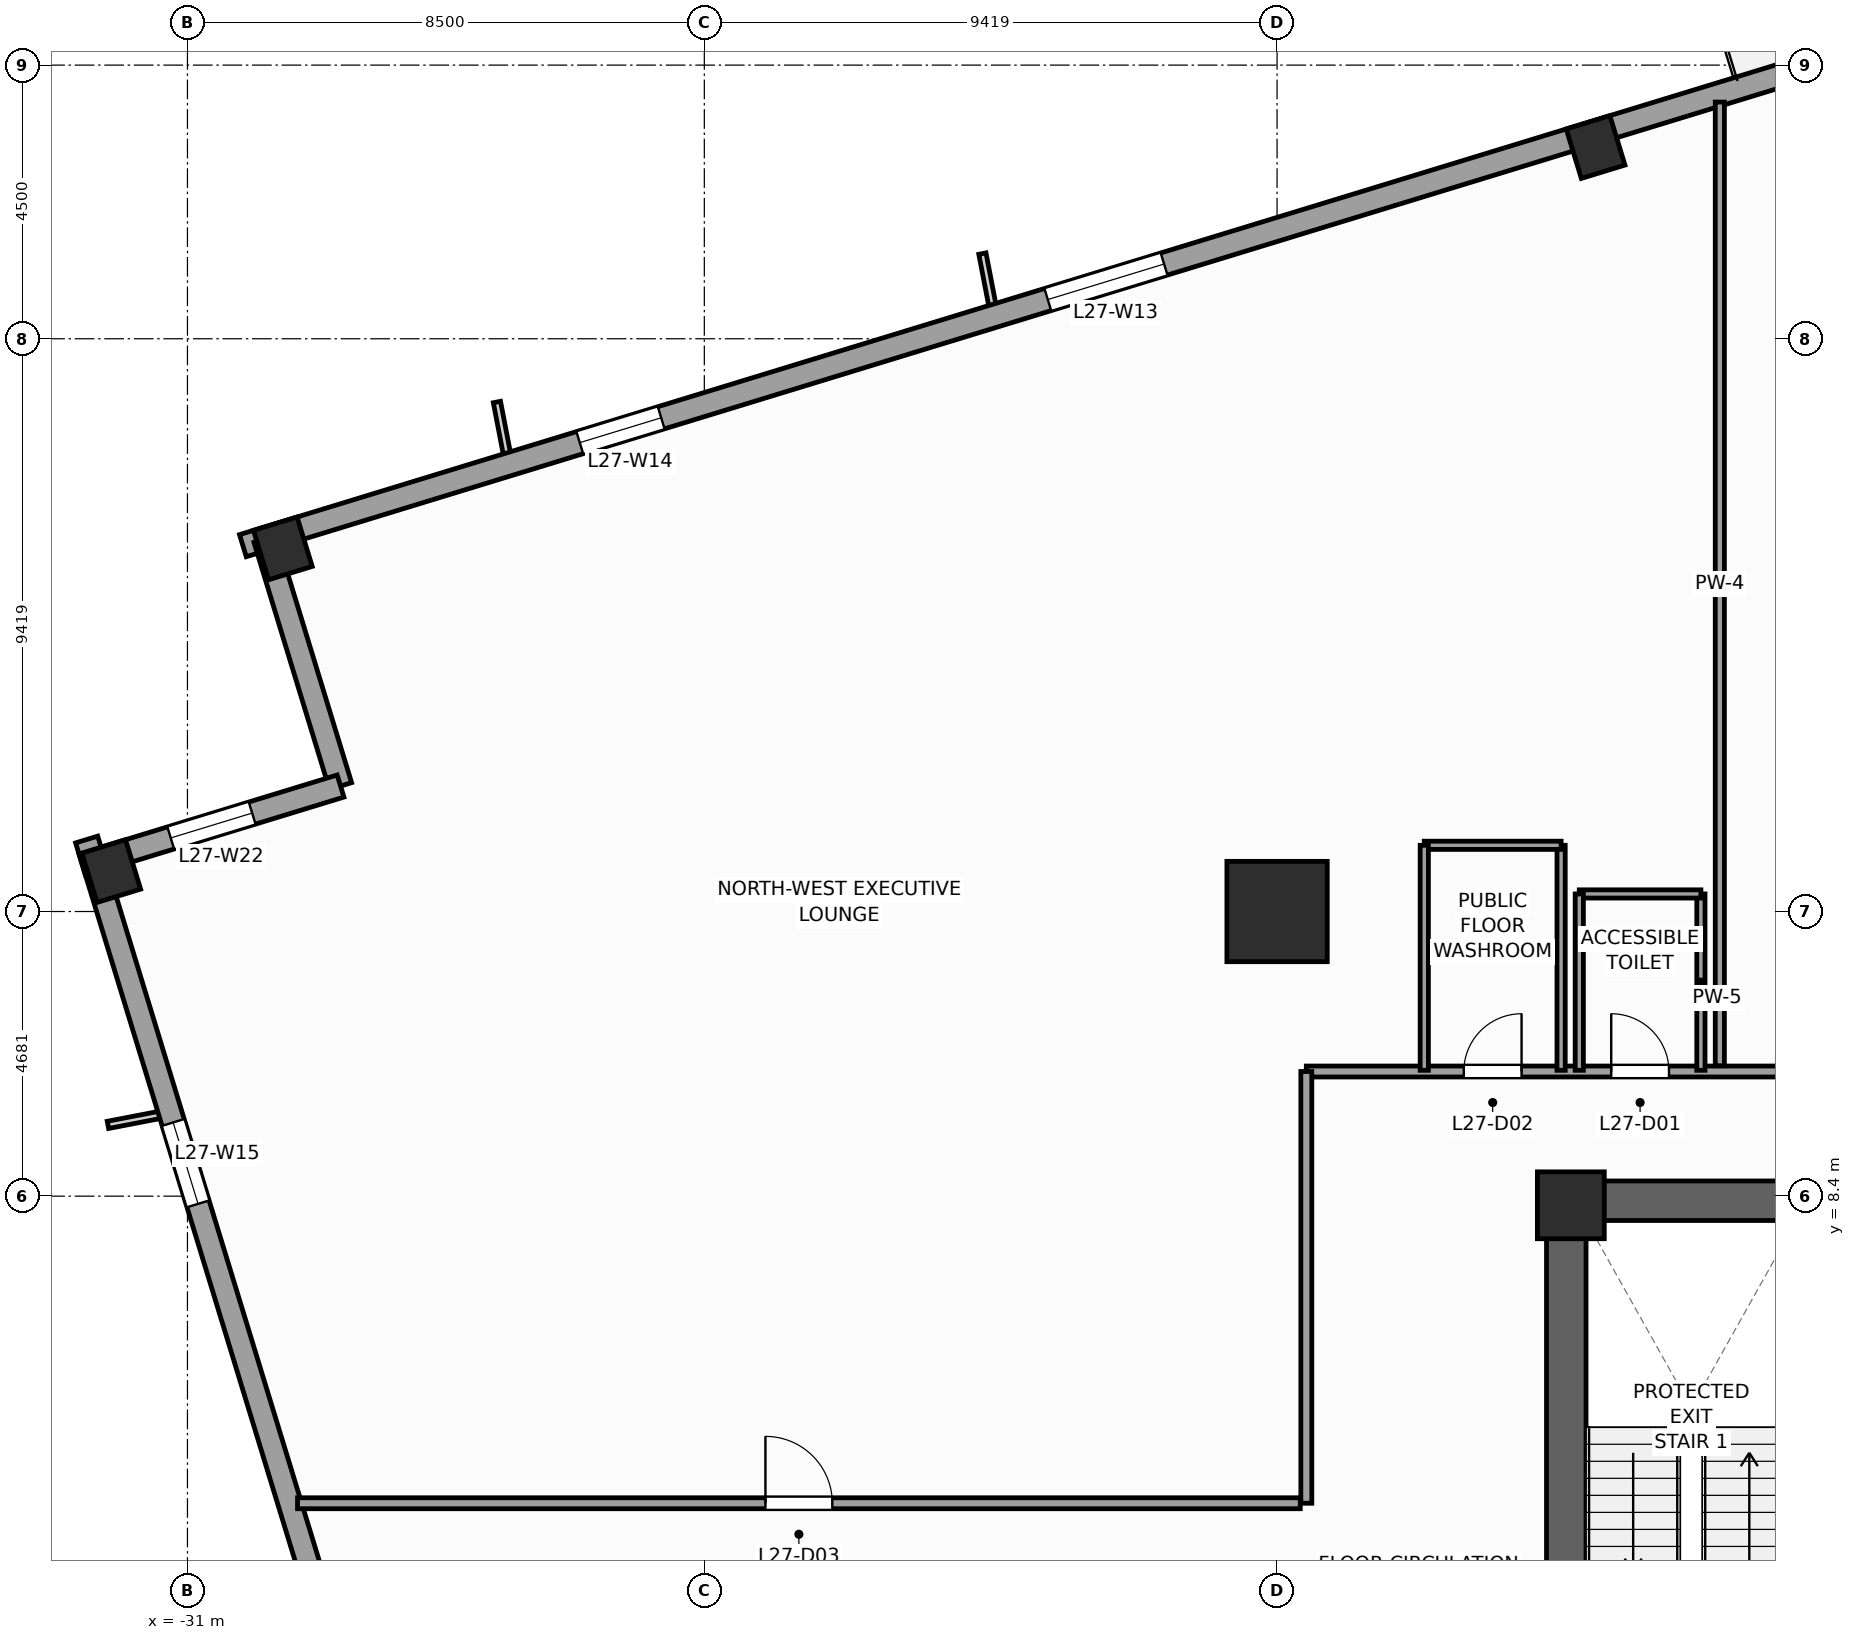
"""IFC4 building model, lengths in metres.
Left out: names, types, materials, properties, quantities, classifications, styles, units other than length and angle.
Written with IfcOpenShell. Run it as: python <this file> out.ifc"""

import sys

from ifc_helpers import new_model, si_unit, direction, frame, frame_2d, origin, origin_2d, place, context, subcontext, project, spatial, rectangle, extrude, source, transform, mapped, element, fill, save


model = new_model("IFC4")
c1 = context("Model", 3, precision=1e-05, world=origin(), true_north=direction((0.0, 1.0)))
c2 = subcontext(c1, "Body", "Model", "MODEL_VIEW")
j1 = project(units=[si_unit("LENGTHUNIT", "METRE"), si_unit("PLANEANGLEUNIT", "RADIAN")], contexts=[c1])
p1 = place(None, origin())
s1 = spatial("IfcSite", under=j1, at=p1, CompositionType="ELEMENT")
p2 = place(p1, origin())
s2 = spatial("IfcBuilding", under=s1, at=p2, CompositionType="ELEMENT")
p3 = place(p2, frame((0.0, 0.0, 115.2)))
s3 = spatial("IfcBuildingStorey", under=s2, at=p3, CompositionType="ELEMENT", Elevation=115.2)
p4 = place(p3, frame((-8.65, 8.325, 0.0), z_axis=(0.0, 0.0, 1.0), x_axis=(1.0, 0.0, 0.0)))
e1 = element("IfcWall", 1, at=p4, inside=s3, PredefinedType="SHEAR", context=c2, shape_type="SweptSolid", body=[
    extrude(rectangle(XDim=17.3, YDim=0.65, at=frame_2d((8.65, 0.0))), origin(), (0.0, 0.0, 1.0), 4.0),
])
p5 = place(p3, frame((-8.325, -8.0, 0.0), z_axis=(0.0, 0.0, 1.0), x_axis=(0.0, 1.0, 0.0)))
e2 = element("IfcWall", 2, at=p5, inside=s3, PredefinedType="SHEAR", context=c2, shape_type="SweptSolid", body=[
    extrude(rectangle(XDim=16.0, YDim=0.65, at=frame_2d((8.0, 0.0))), origin(), (0.0, 0.0, 1.0), 4.0),
])
p6 = place(p5, frame((4.69, 0.0, 0.0)))
e3 = element("IfcOpeningElement", 3, at=p6, cuts=e2, PredefinedType="OPENING", context=c2, shape_type="SweptSolid", body=[
    extrude(rectangle(XDim=1.3, YDim=2.2, at=frame_2d((0.65, 1.1))), frame((0.0, 0.335, 0.0), z_axis=(0.0, -1.0, 0.0), x_axis=(1.0, 0.0, 0.0)), (0.0, 0.0, 1.0), 0.67),
])
m1 = source(origin(), c2, "Body", "SweptSolid", [
    extrude(rectangle(XDim=1.1, YDim=1.1, at=origin_2d()), origin(), (0.0, 0.0, 1.0), 4.0),
])
p7 = place(p3, frame((-8.25, 8.25, 0.0), z_axis=(0.0, 0.0, 1.0), x_axis=(1.0, 0.0, 0.0)))
e4 = element("IfcColumn", 4, at=p7, inside=s3, PredefinedType="PILASTER", context=c2, shape_type="MappedRepresentation", body=[
    mapped(m1, transform((0.0, 0.0, 0.0), scale=1.0)),
])
m2 = source(origin(), c2, "Body", "SweptSolid", [
    extrude(rectangle(XDim=1.65, YDim=1.65, at=origin_2d()), origin(), (0.0, 0.0, 1.0), 4.0),
])
p8 = place(p3, frame((-13.081, 13.081, 0.0), z_axis=(0.0, 0.0, 1.0), x_axis=(1.0, 0.0, 0.0)))
e5 = element("IfcColumn", 5, at=p8, inside=s3, PredefinedType="COLUMN", context=c2, shape_type="MappedRepresentation", body=[
    mapped(m2, transform((0.0, 0.0, 0.0), scale=1.0)),
])
m3 = source(origin(), c2, "Body", "SweptSolid", [
    extrude(rectangle(XDim=0.75, YDim=0.85, at=origin_2d()), origin(), (0.0, 0.0, 1.0), 4.0),
])
for number, where, z_axis, x_axis in (
    (6, (-7.843, 25.653, 0.0), (0.0, 0.0, 1.0), (0.956, 0.292, 0.0)),
    (7, (-29.431, 19.052, 0.0), (0.0, 0.0, 1.0), (0.956, 0.292, 0.0)),
    (8, (-32.253, 13.746, 0.0), (0.0, 0.0, 1.0), (0.956, 0.292, 0.0)),
):
    element("IfcColumn", number, at=place(p3, frame(where, z_axis=z_axis, x_axis=x_axis)), inside=s3, PredefinedType="COLUMN", context=c2, shape_type="MappedRepresentation", body=[
        mapped(m3, transform((0.0, 0.0, 0.0), scale=1.0)),
    ])
p9 = place(p3, frame((14.265, 32.658, 0.0), z_axis=(0.0, 0.0, 1.0), x_axis=(-0.956304320851, -0.292373127906, 0.0)))
e9 = element("IfcWall", 9, at=p9, inside=s3, PredefinedType="STANDARD", context=c2, shape_type="SweptSolid", body=[
    extrude(rectangle(XDim=46.38, YDim=0.38, at=frame_2d((23.19, 0.0))), origin(), (0.0, 0.0, 1.0), 3.14),
])
p10 = place(p9, frame((17.065, 0.0, 0.0)))
e10 = element("IfcOpeningElement", 10, at=p10, cuts=e9, PredefinedType="OPENING", context=c2, shape_type="SweptSolid", body=[
    extrude(rectangle(XDim=1.05, YDim=2.25, at=frame_2d((0.525, 1.125))), frame((0.0, 0.2, 0.0), z_axis=(0.0, -1.0, 0.0), x_axis=(1.0, 0.0, 0.0)), (0.0, 0.0, 1.0), 0.4),
])
p11 = place(p9, frame((4.865, 0.0, 0.51)))
e11 = element("IfcOpeningElement", 11, at=p11, cuts=e9, PredefinedType="OPENING", context=c2, shape_type="SweptSolid", body=[
    extrude(rectangle(XDim=1.4, YDim=2.4, at=frame_2d((0.7, 1.2))), frame((0.0, 0.2, 0.0), z_axis=(0.0, -1.0, 0.0), x_axis=(1.0, 0.0, 0.0)), (0.0, 0.0, 1.0), 0.4),
])
p12 = place(p9, frame((12.45, 0.0, 0.51)))
e12 = element("IfcOpeningElement", 12, at=p12, cuts=e9, PredefinedType="OPENING", context=c2, shape_type="SweptSolid", body=[
    extrude(rectangle(XDim=2.0, YDim=2.4, at=frame_2d((1.0, 1.2))), frame((0.0, 0.2, 0.0), z_axis=(0.0, -1.0, 0.0), x_axis=(1.0, 0.0, 0.0)), (0.0, 0.0, 1.0), 0.4),
])
p13 = place(p9, frame((30.538, 0.0, 0.51)))
e13 = element("IfcOpeningElement", 13, at=p13, cuts=e9, PredefinedType="OPENING", context=c2, shape_type="SweptSolid", body=[
    extrude(rectangle(XDim=2.0, YDim=2.4, at=frame_2d((1.0, 1.2))), frame((0.0, 0.2, 0.0), z_axis=(0.0, -1.0, 0.0), x_axis=(1.0, 0.0, 0.0)), (0.0, 0.0, 1.0), 0.4),
])
p14 = place(p9, frame((39.187, 0.0, 0.51)))
e14 = element("IfcOpeningElement", 14, at=p14, cuts=e9, PredefinedType="OPENING", context=c2, shape_type="SweptSolid", body=[
    extrude(rectangle(XDim=1.4, YDim=2.4, at=frame_2d((0.7, 1.2))), frame((0.0, 0.2, 0.0), z_axis=(0.0, -1.0, 0.0), x_axis=(1.0, 0.0, 0.0)), (0.0, 0.0, 1.0), 0.4),
])
p15 = place(p3, frame((-29.725, 19.208, 0.0), z_axis=(0.0, 0.0, 1.0), x_axis=(0.292345507338, -0.956312764915, 0.0)))
e15 = element("IfcWall", 15, at=p15, inside=s3, PredefinedType="STANDARD", context=c2, shape_type="SweptSolid", body=[
    extrude(rectangle(XDim=4.25, YDim=0.38, at=frame_2d((2.125, 0.0))), origin(), (0.0, 0.0, 1.0), 3.74),
])
p16 = place(p3, frame((-28.482, 15.144, 0.0), z_axis=(0.0, 0.0, 1.0), x_axis=(-0.956304176051, -0.292373601522, 0.0)))
e16 = element("IfcWall", 16, at=p16, inside=s3, PredefinedType="STANDARD", context=c2, shape_type="SweptSolid", body=[
    extrude(rectangle(XDim=4.44, YDim=0.38, at=frame_2d((2.22, 0.0))), origin(), (0.0, 0.0, 1.0), 3.04),
])
p17 = place(p16, frame((1.52, 0.0, 0.51)))
e17 = element("IfcOpeningElement", 17, at=p17, cuts=e16, PredefinedType="OPENING", context=c2, shape_type="SweptSolid", body=[
    extrude(rectangle(XDim=1.4, YDim=2.4, at=frame_2d((0.7, 1.2))), frame((0.0, 0.2, 0.0), z_axis=(0.0, -1.0, 0.0), x_axis=(1.0, 0.0, 0.0)), (0.0, 0.0, 1.0), 0.4),
])
p18 = place(p3, frame((-32.658, 14.265, 0.0), z_axis=(0.0, 0.0, 1.0), x_axis=(0.292373127906, -0.956304320851, 0.0)))
e18 = element("IfcWall", 18, at=p18, inside=s3, PredefinedType="STANDARD", context=c2, shape_type="SweptSolid", body=[
    extrude(rectangle(XDim=46.38, YDim=0.38, at=frame_2d((23.19, 0.0))), origin(), (0.0, 0.0, 1.0), 3.14),
])
p19 = place(p18, frame((4.865, 0.0, 0.51)))
e19 = element("IfcOpeningElement", 19, at=p19, cuts=e18, PredefinedType="OPENING", context=c2, shape_type="SweptSolid", body=[
    extrude(rectangle(XDim=1.4, YDim=2.4, at=frame_2d((0.7, 1.2))), frame((0.0, 0.2, 0.0), z_axis=(0.0, -1.0, 0.0), x_axis=(1.0, 0.0, 0.0)), (0.0, 0.0, 1.0), 0.4),
])
p20 = place(p18, frame((14.7, 0.0, 0.51)))
e20 = element("IfcOpeningElement", 20, at=p20, cuts=e18, PredefinedType="OPENING", context=c2, shape_type="SweptSolid", body=[
    extrude(rectangle(XDim=2.0, YDim=2.4, at=frame_2d((1.0, 1.2))), frame((0.0, 0.2, 0.0), z_axis=(0.0, -1.0, 0.0), x_axis=(1.0, 0.0, 0.0)), (0.0, 0.0, 1.0), 0.4),
])
p21 = place(p18, frame((19.012, 0.0, 0.51)))
e21 = element("IfcOpeningElement", 21, at=p21, cuts=e18, PredefinedType="OPENING", context=c2, shape_type="SweptSolid", body=[
    extrude(rectangle(XDim=2.0, YDim=2.4, at=frame_2d((1.0, 1.2))), frame((0.0, 0.2, 0.0), z_axis=(0.0, -1.0, 0.0), x_axis=(1.0, 0.0, 0.0)), (0.0, 0.0, 1.0), 0.4),
])
p22 = place(p18, frame((30.538, 0.0, 0.51)))
e22 = element("IfcOpeningElement", 22, at=p22, cuts=e18, PredefinedType="OPENING", context=c2, shape_type="SweptSolid", body=[
    extrude(rectangle(XDim=2.0, YDim=2.4, at=frame_2d((1.0, 1.2))), frame((0.0, 0.2, 0.0), z_axis=(0.0, -1.0, 0.0), x_axis=(1.0, 0.0, 0.0)), (0.0, 0.0, 1.0), 0.4),
])
p23 = place(p18, frame((39.187, 0.0, 0.51)))
e23 = element("IfcOpeningElement", 23, at=p23, cuts=e18, PredefinedType="OPENING", context=c2, shape_type="SweptSolid", body=[
    extrude(rectangle(XDim=1.4, YDim=2.4, at=frame_2d((0.7, 1.2))), frame((0.0, 0.2, 0.0), z_axis=(0.0, -1.0, 0.0), x_axis=(1.0, 0.0, 0.0)), (0.0, 0.0, 1.0), 0.4),
])
p24 = place(p3, frame((-12.6, 10.45, 0.0), z_axis=(0.0, 0.0, 1.0), x_axis=(1.0, 0.0, 0.0)))
e24 = element("IfcWall", 24, at=p24, inside=s3, PredefinedType="PARTITIONING", context=c2, shape_type="SweptSolid", body=[
    extrude(rectangle(XDim=25.2, YDim=0.18, at=frame_2d((12.6, 0.0))), origin(), (0.0, 0.0, 1.0), 3.74),
])
p25 = place(p24, frame((5.014, 0.0, 0.0)))
e25 = element("IfcOpeningElement", 25, at=p25, cuts=e24, PredefinedType="OPENING", context=c2, shape_type="SweptSolid", body=[
    extrude(rectangle(XDim=0.95, YDim=2.1, at=frame_2d((0.475, 1.05))), frame((0.0, 0.1, 0.0), z_axis=(0.0, -1.0, 0.0), x_axis=(1.0, 0.0, 0.0)), (0.0, 0.0, 1.0), 0.2),
])
p26 = place(p24, frame((2.59, 0.0, 0.0)))
e26 = element("IfcOpeningElement", 26, at=p26, cuts=e24, PredefinedType="OPENING", context=c2, shape_type="SweptSolid", body=[
    extrude(rectangle(XDim=0.95, YDim=2.1, at=frame_2d((0.475, 1.05))), frame((0.0, 0.1, 0.0), z_axis=(0.0, -1.0, 0.0), x_axis=(1.0, 0.0, 0.0)), (0.0, 0.0, 1.0), 0.2),
])
p27 = place(p24, frame((12.05, 0.0, 0.0)))
e27 = element("IfcOpeningElement", 27, at=p27, cuts=e24, PredefinedType="OPENING", context=c2, shape_type="SweptSolid", body=[
    extrude(rectangle(XDim=1.1, YDim=2.2, at=frame_2d((0.55, 1.1))), frame((0.0, 0.1, 0.0), z_axis=(0.0, -1.0, 0.0), x_axis=(1.0, 0.0, 0.0)), (0.0, 0.0, 1.0), 0.2),
])
p28 = place(p3, frame((-12.6, 3.35, 0.0), z_axis=(0.0, 0.0, 1.0), x_axis=(0.0, 1.0, 0.0)))
e28 = element("IfcWall", 28, at=p28, inside=s3, PredefinedType="PARTITIONING", context=c2, shape_type="SweptSolid", body=[
    extrude(rectangle(XDim=7.1, YDim=0.18, at=frame_2d((3.55, 0.0))), origin(), (0.0, 0.0, 1.0), 3.74),
])
p29 = place(p3, frame((-29.19, 3.35, 0.0), z_axis=(0.0, 0.0, 1.0), x_axis=(1.0, 0.0, 0.0)))
e29 = element("IfcWall", 29, at=p29, inside=s3, PredefinedType="PARTITIONING", context=c2, shape_type="SweptSolid", body=[
    extrude(rectangle(XDim=16.49, YDim=0.18, at=frame_2d((8.245, 0.0))), origin(), (0.0, 0.0, 1.0), 3.74),
])
p30 = place(p29, frame((7.695, 0.0, 0.0)))
e30 = element("IfcOpeningElement", 30, at=p30, cuts=e29, PredefinedType="OPENING", context=c2, shape_type="SweptSolid", body=[
    extrude(rectangle(XDim=1.1, YDim=2.2, at=frame_2d((0.55, 1.1))), frame((0.0, 0.1, 0.0), z_axis=(0.0, -1.0, 0.0), x_axis=(1.0, 0.0, 0.0)), (0.0, 0.0, 1.0), 0.2),
])
p31 = place(p3, frame((-5.8, 10.545, 0.0), z_axis=(0.0, 0.0, 1.0), x_axis=(0.0, 1.0, 0.0)))
e31 = element("IfcWall", 31, at=p31, inside=s3, PredefinedType="PARTITIONING", context=c2, shape_type="SweptSolid", body=[
    extrude(rectangle(XDim=15.848, YDim=0.15, at=frame_2d((7.924, 0.0))), origin(), (0.0, 0.0, 1.0), 3.74),
])
p32 = place(p3, frame((-6.111, 10.47, 0.0), z_axis=(0.0, 0.0, 1.0), x_axis=(0.0, 1.0, 0.0)))
e32 = element("IfcWall", 32, at=p32, inside=s3, PredefinedType="PARTITIONING", context=c2, shape_type="SweptSolid", body=[
    extrude(rectangle(XDim=2.9, YDim=0.135, at=frame_2d((1.45, 0.0))), origin(), (0.0, 0.0, 1.0), 3.74),
])
p33 = place(p3, frame((-8.111, 13.37, 0.0), z_axis=(0.0, 0.0, 1.0), x_axis=(1.0, 0.0, 0.0)))
e33 = element("IfcWall", 33, at=p33, inside=s3, PredefinedType="PARTITIONING", context=c2, shape_type="SweptSolid", body=[
    extrude(rectangle(XDim=2.0, YDim=0.135, at=frame_2d((1.0, 0.0))), origin(), (0.0, 0.0, 1.0), 2.732),
])
p34 = place(p3, frame((-8.111, 10.47, 0.0), z_axis=(0.0, 0.0, 1.0), x_axis=(0.0, 1.0, 0.0)))
e34 = element("IfcWall", 34, at=p34, inside=s3, PredefinedType="PARTITIONING", context=c2, shape_type="SweptSolid", body=[
    extrude(rectangle(XDim=2.9, YDim=0.135, at=frame_2d((1.45, 0.0))), origin(), (0.0, 0.0, 1.0), 3.74),
])
p35 = place(p3, frame((-8.41, 10.47, 0.0), z_axis=(0.0, 0.0, 1.0), x_axis=(0.0, 1.0, 0.0)))
e35 = element("IfcWall", 35, at=p35, inside=s3, PredefinedType="PARTITIONING", context=c2, shape_type="SweptSolid", body=[
    extrude(rectangle(XDim=3.7, YDim=0.135, at=frame_2d((1.85, 0.0))), origin(), (0.0, 0.0, 1.0), 3.74),
])
p36 = place(p3, frame((-10.66, 14.17, 0.0), z_axis=(0.0, 0.0, 1.0), x_axis=(1.0, 0.0, 0.0)))
e36 = element("IfcWall", 36, at=p36, inside=s3, PredefinedType="PARTITIONING", context=c2, shape_type="SweptSolid", body=[
    extrude(rectangle(XDim=2.25, YDim=0.135, at=frame_2d((1.125, 0.0))), origin(), (0.0, 0.0, 1.0), 3.74),
])
p37 = place(p3, frame((-10.66, 10.47, 0.0), z_axis=(0.0, 0.0, 1.0), x_axis=(0.0, 1.0, 0.0)))
e37 = element("IfcWall", 37, at=p37, inside=s3, PredefinedType="PARTITIONING", context=c2, shape_type="SweptSolid", body=[
    extrude(rectangle(XDim=3.7, YDim=0.135, at=frame_2d((1.85, 0.0))), origin(), (0.0, 0.0, 1.0), 3.74),
])
m4 = source(origin(), c2, "Body", "SweptSolid", [
    extrude(rectangle(XDim=2.0, YDim=2.4, at=frame_2d((1.0, 1.2))), frame((0.0, 0.03, 0.0), z_axis=(0.0, -1.0, 0.0), x_axis=(1.0, 0.0, 0.0)), (0.0, 0.0, 1.0), 0.06),
])
p38 = place(p13, origin())
e38 = element("IfcWindow", 38, at=p38, inside=s3, PartitioningType="SINGLE_PANEL", PredefinedType="WINDOW", context=c2, shape_type="MappedRepresentation", body=[
    mapped(m4, transform((0.0, 0.0, 0.0), scale=1.0)),
])
fill(e13, e38)
m5 = source(origin(), c2, "Body", "SweptSolid", [
    extrude(rectangle(XDim=1.4, YDim=2.4, at=frame_2d((0.7, 1.2))), frame((0.0, 0.03, 0.0), z_axis=(0.0, -1.0, 0.0), x_axis=(1.0, 0.0, 0.0)), (0.0, 0.0, 1.0), 0.06),
])
p39 = place(p14, origin())
e39 = element("IfcWindow", 39, at=p39, inside=s3, PartitioningType="SINGLE_PANEL", PredefinedType="WINDOW", context=c2, shape_type="MappedRepresentation", body=[
    mapped(m5, transform((0.0, 0.0, 0.0), scale=1.0)),
])
fill(e14, e39)
p40 = place(p19, origin())
e40 = element("IfcWindow", 40, at=p40, inside=s3, PartitioningType="SINGLE_PANEL", PredefinedType="WINDOW", context=c2, shape_type="MappedRepresentation", body=[
    mapped(m5, transform((0.0, 0.0, 0.0), scale=1.0)),
])
fill(e19, e40)
p41 = place(p17, origin())
e41 = element("IfcWindow", 41, at=p41, inside=s3, PartitioningType="SINGLE_PANEL", PredefinedType="WINDOW", context=c2, shape_type="MappedRepresentation", body=[
    mapped(m5, transform((0.0, 0.0, 0.0), scale=1.0)),
])
fill(e17, e41)
m6 = source(origin(), c2, "Body", "SweptSolid", [
    extrude(rectangle(XDim=0.95, YDim=2.1, at=frame_2d((0.475, 1.05))), frame((0.0, 0.025, 0.0), z_axis=(0.0, -1.0, 0.0), x_axis=(1.0, 0.0, 0.0)), (0.0, 0.0, 1.0), 0.05),
])
p42 = place(p25, origin())
e42 = element("IfcDoor", 42, at=p42, inside=s3, OperationType="SINGLE_SWING_LEFT", PredefinedType="DOOR", context=c2, shape_type="MappedRepresentation", body=[
    mapped(m6, transform((0.0, 0.0, 0.0), scale=1.0)),
])
fill(e25, e42)
p43 = place(p26, origin())
e43 = element("IfcDoor", 43, at=p43, inside=s3, OperationType="SINGLE_SWING_RIGHT", PredefinedType="DOOR", context=c2, shape_type="MappedRepresentation", body=[
    mapped(m6, transform((0.0, 0.0, 0.0), scale=1.0)),
])
fill(e26, e43)
m7 = source(origin(), c2, "Body", "SweptSolid", [
    extrude(rectangle(XDim=1.1, YDim=2.2, at=frame_2d((0.55, 1.1))), frame((0.0, 0.025, 0.0), z_axis=(0.0, -1.0, 0.0), x_axis=(1.0, 0.0, 0.0)), (0.0, 0.0, 1.0), 0.05),
])
p44 = place(p30, origin())
e44 = element("IfcDoor", 44, at=p44, inside=s3, OperationType="SINGLE_SWING_LEFT", PredefinedType="DOOR", context=c2, shape_type="MappedRepresentation", body=[
    mapped(m7, transform((0.0, 0.0, 0.0), scale=1.0)),
])
fill(e30, e44)
save(model, sys.argv[1])
